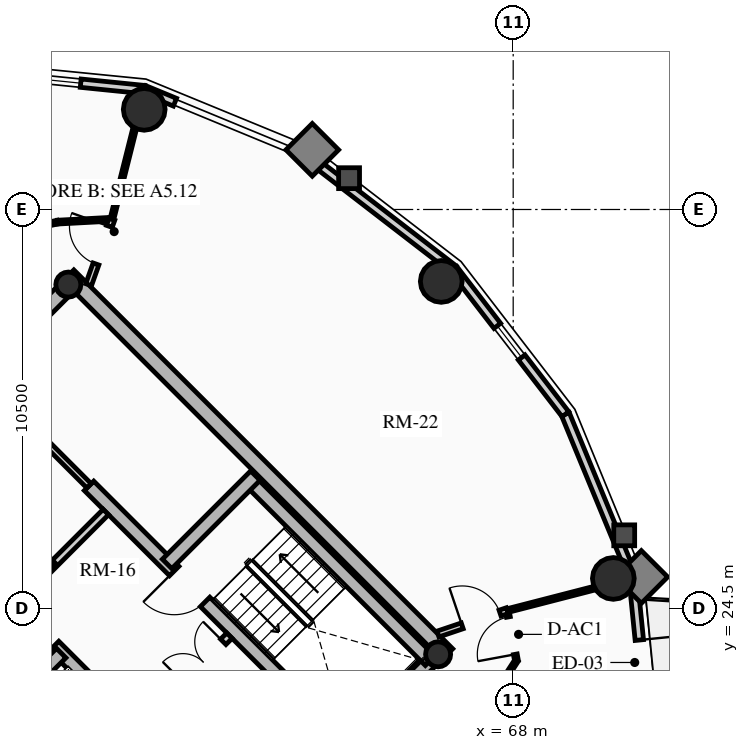
"""IFC4 building model, lengths in metres.
Left out: names, types, materials, properties, quantities, classifications, styles, units other than length and angle.
Written with IfcOpenShell. Run it as: python <this file> out.ifc"""

import sys

from ifc_helpers import new_model, si_unit, direction, frame, frame_2d, origin, origin_2d, place, context, subcontext, project, spatial, rectangle, circle, hollow_circle, extrude, source, transform, mapped, element, fill, save


model = new_model("IFC4")
c1 = context("Model", 3, precision=1e-05, world=origin(), true_north=direction((0.0, 1.0)))
c2 = subcontext(c1, "Body", "Model", "MODEL_VIEW")
j1 = project(units=[si_unit("LENGTHUNIT", "METRE"), si_unit("PLANEANGLEUNIT", "RADIAN")], contexts=[c1])
p1 = place(None, origin())
s1 = spatial("IfcSite", under=j1, at=p1, CompositionType="ELEMENT")
p2 = place(p1, origin())
s2 = spatial("IfcBuilding", under=s1, at=p2, CompositionType="ELEMENT")
p3 = place(p2, frame((0.0, 0.0, 196.66)))
s3 = spatial("IfcBuildingStorey", under=s2, at=p3, CompositionType="ELEMENT", Elevation=196.66)
for number, where, z_axis, x_axis in (
    (1, (58.702, 15.732, 0.0), (0.0, 0.0, 1.0), (-0.707, 0.707, 0.0)),
    (2, (66.268, 23.298, 0.0), (0.0, 0.0, 1.0), (-0.707, 0.707, 0.0)),
):
    element("IfcWall", number, at=place(p3, frame(where, z_axis=z_axis, x_axis=x_axis)), inside=s3, PredefinedType="SHEAR", context=c2, shape_type="SweptSolid", body=[
        extrude(rectangle(XDim=14.1, YDim=0.4, at=frame_2d((7.05, 0.0))), origin(), (0.0, 0.0, 1.0), 2.91),
    ])
p4 = place(p3, frame((58.561, 15.873, 0.0), z_axis=(0.0, 0.0, 1.0), x_axis=(0.707106781187, 0.707106781187, 0.0)))
e3 = element("IfcWall", 3, at=p4, inside=s3, PredefinedType="SHEAR", context=c2, shape_type="SweptSolid", body=[
    extrude(rectangle(XDim=10.7, YDim=0.4, at=frame_2d((5.35, 0.0))), origin(), (0.0, 0.0, 1.0), 2.91),
])
m1 = source(origin(), c2, "Body", "SweptSolid", [
    extrude(rectangle(XDim=1.5, YDim=2.02, at=frame_2d((0.75, 1.01))), frame((0.0, 0.21, 0.0), z_axis=(0.0, -1.0, 0.0), x_axis=(1.0, 0.0, 0.0)), (0.0, 0.0, 1.0), 0.42),
])
p5 = place(p4, frame((5.45, 0.0, 0.0)))
e4 = element("IfcOpeningElement", 4, at=p5, cuts=e3, PredefinedType="OPENING", context=c2, shape_type="MappedRepresentation", body=[
    mapped(m1, transform((0.0, 0.0, 0.0), x_axis=(1.0, 0.0, 0.0), y_axis=(0.0, 1.0, 0.0), z_axis=(0.0, 0.0, 1.0), scale=1.0)),
])
p6 = place(p3, frame((48.873, 25.561, 0.0), z_axis=(0.0, 0.0, 1.0), x_axis=(0.707106781187, 0.707106781187, 0.0)))
e5 = element("IfcWall", 5, at=p6, inside=s3, PredefinedType="SHEAR", context=c2, shape_type="SweptSolid", body=[
    extrude(rectangle(XDim=10.7, YDim=0.4, at=frame_2d((5.35, 0.0))), origin(), (0.0, 0.0, 1.0), 2.91),
])
p7 = place(p6, frame((4.6, 0.0, 0.0)))
e6 = element("IfcOpeningElement", 6, at=p7, cuts=e5, PredefinedType="OPENING", context=c2, shape_type="MappedRepresentation", body=[
    mapped(m1, transform((0.0, 0.0, 0.0), x_axis=(1.0, 0.0, 0.0), y_axis=(0.0, 1.0, 0.0), z_axis=(0.0, 0.0, 1.0), scale=1.0)),
])
p8 = place(p3, frame((61.06, 18.373, 0.0), z_axis=(0.0, 0.0, 1.0), x_axis=(-0.707106781187, 0.707106781187, 0.0)))
e7 = element("IfcWall", 7, at=p8, inside=s3, PredefinedType="SHEAR", context=c2, shape_type="SweptSolid", body=[
    extrude(rectangle(XDim=13.7, YDim=0.35, at=frame_2d((6.85, 0.0))), origin(), (0.0, 0.0, 1.0), 2.91),
])
m2 = source(origin(), c2, "Body", "SweptSolid", [
    extrude(rectangle(XDim=1.1, YDim=2.015, at=frame_2d((0.55, 1.007))), frame((0.0, 0.185, 0.0), z_axis=(0.0, -1.0, 0.0), x_axis=(1.0, 0.0, 0.0)), (0.0, 0.0, 1.0), 0.37),
])
p9 = place(p8, frame((4.85, 0.0, 0.0)))
e8 = element("IfcOpeningElement", 8, at=p9, cuts=e7, PredefinedType="OPENING", context=c2, shape_type="MappedRepresentation", body=[
    mapped(m2, transform((0.0, 0.0, 0.0), x_axis=(1.0, 0.0, 0.0), y_axis=(0.0, 1.0, 0.0), z_axis=(0.0, 0.0, 1.0), scale=1.0)),
])
p10 = place(p8, frame((0.625, 0.0, 0.0)))
e9 = element("IfcOpeningElement", 9, at=p10, cuts=e7, PredefinedType="OPENING", context=c2, shape_type="MappedRepresentation", body=[
    mapped(m2, transform((0.0, 0.0, 0.0), x_axis=(1.0, 0.0, 0.0), y_axis=(0.0, 1.0, 0.0), z_axis=(0.0, 0.0, 1.0), scale=1.0)),
])
p11 = place(p8, frame((2.625, 0.0, 0.0)))
e10 = element("IfcOpeningElement", 10, at=p11, cuts=e7, PredefinedType="OPENING", context=c2, shape_type="MappedRepresentation", body=[
    mapped(m2, transform((0.0, 0.0, 0.0), x_axis=(1.0, 0.0, 0.0), y_axis=(0.0, 1.0, 0.0), z_axis=(0.0, 0.0, 1.0), scale=1.0)),
])
m3 = source(origin(), c2, "Body", "SweptSolid", [
    extrude(rectangle(XDim=1.15, YDim=2.02, at=frame_2d((0.575, 1.01))), frame((0.0, 0.185, 0.0), z_axis=(0.0, -1.0, 0.0), x_axis=(1.0, 0.0, 0.0)), (0.0, 0.0, 1.0), 0.37),
])
p12 = place(p8, frame((7.27, 0.0, 0.0)))
e11 = element("IfcOpeningElement", 11, at=p12, cuts=e7, PredefinedType="OPENING", context=c2, shape_type="MappedRepresentation", body=[
    mapped(m3, transform((0.0, 0.0, 0.0), x_axis=(1.0, 0.0, 0.0), y_axis=(0.0, 1.0, 0.0), z_axis=(0.0, 0.0, 1.0), scale=1.0)),
])
p13 = place(p3, frame((63.627, 20.94, 0.0), z_axis=(0.0, 0.0, 1.0), x_axis=(-0.707119496762, 0.707094065383, 0.0)))
e12 = element("IfcWall", 12, at=p13, inside=s3, PredefinedType="SHEAR", context=c2, shape_type="SweptSolid", body=[
    extrude(rectangle(XDim=9.6, YDim=0.35, at=frame_2d((4.8, 0.0))), origin(), (0.0, 0.0, 1.0), 2.91),
])
p14 = place(p13, frame((5.28, 0.0, 0.0)))
e13 = element("IfcOpeningElement", 13, at=p14, cuts=e12, PredefinedType="OPENING", context=c2, shape_type="MappedRepresentation", body=[
    mapped(m3, transform((0.0, 0.0, 0.0), x_axis=(1.0, 0.0, 0.0), y_axis=(0.0, 1.0, 0.0), z_axis=(0.0, 0.0, 1.0), scale=1.0)),
])
p15 = place(p3, frame((53.784, 21.003, 0.0), z_axis=(0.0, 0.0, 1.0), x_axis=(0.707106781187, 0.707106781187, 0.0)))
e14 = element("IfcWall", 14, at=p15, inside=s3, PredefinedType="SHEAR", context=c2, shape_type="SweptSolid", body=[
    extrude(rectangle(XDim=3.285, YDim=0.35, at=frame_2d((1.643, 0.0))), origin(), (0.0, 0.0, 1.0), 2.91),
])
p16 = place(p3, frame((65.812, 23.125, 0.0), z_axis=(0.0, 0.0, 1.0), x_axis=(-0.707106781187, 0.707106781187, 0.0)))
e15 = element("IfcWall", 15, at=p16, inside=s3, PredefinedType="SHEAR", context=c2, shape_type="SweptSolid", body=[
    extrude(rectangle(XDim=6.695, YDim=0.35, at=frame_2d((3.348, 0.0))), origin(), (0.0, 0.0, 1.0), 2.91),
])
p17 = place(p3, frame((58.893, 25.674, 0.0), z_axis=(0.0, 0.0, 1.0), x_axis=(0.707106781187, 0.707106781187, 0.0)))
e16 = element("IfcWall", 16, at=p17, inside=s3, PredefinedType="SHEAR", context=c2, shape_type="SweptSolid", body=[
    extrude(rectangle(XDim=3.285, YDim=0.35, at=frame_2d((1.643, 0.0))), origin(), (0.0, 0.0, 1.0), 2.91),
])
for number, where, z_axis, x_axis in (
    (17, (66.024, 23.294, 0.0), (0.0, 0.0, 1.0), (0.707, 0.707, 0.0)),
    (18, (56.294, 33.024, 0.0), (0.0, 0.0, 1.0), (0.707, 0.707, 0.0)),
):
    element("IfcColumn", number, at=place(p3, frame(where, z_axis=z_axis, x_axis=x_axis)), inside=s3, PredefinedType="COLUMN", context=c2, shape_type="SweptSolid", body=[
        extrude(hollow_circle(Radius=0.33, WallThickness=0.025, at=origin_2d()), origin(), (0.0, 0.0, 1.0), 2.91),
    ])
for number, where, z_axis, x_axis in (
    (19, (66.107, 33.107, 0.0), (0.0, 0.0, 1.0), (1.0, 0.0, 0.0)),
    (20, (58.291, 37.635, 0.0), (0.0, 0.0, 1.0), (1.0, 0.0, 0.0)),
    (21, (70.635, 25.291, 0.0), (0.0, 0.0, 1.0), (1.0, 0.0, 0.0)),
):
    element("IfcColumn", number, at=place(p3, frame(where, z_axis=z_axis, x_axis=x_axis)), inside=s3, PredefinedType="USERDEFINED", context=c2, shape_type="SweptSolid", body=[
        extrude(circle(Radius=0.55, at=origin_2d()), origin(), (0.0, 0.0, 1.0), 2.91),
    ])
p18 = place(p3, frame((62.613, 36.374, 0.0), z_axis=(0.0, 0.0, 1.0), x_axis=(0.791998462147, -0.610523083886, 0.0)))
e22 = element("IfcWall", 22, at=p18, inside=s3, PredefinedType="SOLIDWALL", context=c2, shape_type="SweptSolid", body=[
    extrude(rectangle(XDim=4.82, YDim=0.22, at=frame_2d((2.41, 0.0))), origin(), (0.0, 0.0, 1.0), 2.322),
])
p19 = place(p3, frame((58.295, 38.155, 0.0), z_axis=(0.0, 0.0, 1.0), x_axis=(0.924515260676, -0.381145028536, 0.0)))
e23 = element("IfcWall", 23, at=p19, inside=s3, PredefinedType="SOLIDWALL", context=c2, shape_type="SweptSolid", body=[
    extrude(rectangle(XDim=0.87, YDim=0.22, at=frame_2d((0.435, 0.0))), origin(), (0.0, 0.0, 1.0), 2.322),
])
p20 = place(p3, frame((53.9, 38.599, 0.0), z_axis=(0.0, 0.0, 1.0), x_axis=(0.994929930991, -0.100570534541, 0.0)))
e24 = element("IfcWall", 24, at=p20, inside=s3, PredefinedType="SOLIDWALL", context=c2, shape_type="SweptSolid", body=[
    extrude(rectangle(XDim=4.418, YDim=0.22, at=frame_2d((2.209, 0.0))), origin(), (0.0, 0.0, 1.0), 2.322),
])
m4 = source(origin(), c2, "Body", "SweptSolid", [
    extrude(rectangle(XDim=1.05, YDim=1.3, at=frame_2d((0.525, 0.65))), frame((0.0, 0.12, 0.0), z_axis=(0.0, -1.0, 0.0), x_axis=(1.0, 0.0, 0.0)), (0.0, 0.0, 1.0), 0.24),
])
p21 = place(p20, frame((1.684, 0.0, 0.65)))
e25 = element("IfcOpeningElement", 25, at=p21, cuts=e24, PredefinedType="OPENING", context=c2, shape_type="MappedRepresentation", body=[
    mapped(m4, transform((0.0, 0.0, 0.0), x_axis=(1.0, 0.0, 0.0), y_axis=(0.0, 1.0, 0.0), z_axis=(0.0, 0.0, 1.0), scale=1.0)),
])
p22 = place(p3, frame((71.155, 25.295, 0.0), z_axis=(0.0, 0.0, 1.0), x_axis=(0.100570534541, -0.994929930991, 0.0)))
e26 = element("IfcWall", 26, at=p22, inside=s3, PredefinedType="SOLIDWALL", context=c2, shape_type="SweptSolid", body=[
    extrude(rectangle(XDim=4.418, YDim=0.22, at=frame_2d((2.209, 0.0))), origin(), (0.0, 0.0, 1.0), 2.322),
])
m5 = source(origin(), c2, "Body", "SweptSolid", [
    extrude(rectangle(XDim=1.15, YDim=2.005, at=frame_2d((0.575, 1.002))), frame((0.0, 0.12, 0.0), z_axis=(0.0, -1.0, 0.0), x_axis=(1.0, 0.0, 0.0)), (0.0, 0.0, 1.0), 0.24),
])
p23 = place(p22, frame((1.634, 0.0, 0.0)))
e27 = element("IfcOpeningElement", 27, at=p23, cuts=e26, PredefinedType="OPENING", context=c2, shape_type="MappedRepresentation", body=[
    mapped(m5, transform((0.0, 0.0, 0.0), x_axis=(1.0, 0.0, 0.0), y_axis=(0.0, 1.0, 0.0), z_axis=(0.0, 0.0, 1.0), scale=1.0)),
])
p24 = place(p3, frame((69.374, 29.613, 0.0), z_axis=(0.0, 0.0, 1.0), x_axis=(0.381309704956, -0.924447353237, 0.0)))
e28 = element("IfcWall", 28, at=p24, inside=s3, PredefinedType="SOLIDWALL", context=c2, shape_type="SweptSolid", body=[
    extrude(rectangle(XDim=4.671, YDim=0.22, at=frame_2d((2.335, 0.0))), origin(), (0.0, 0.0, 1.0), 2.322),
])
p25 = place(p3, frame((66.431, 33.431, 0.0), z_axis=(0.0, 0.0, 1.0), x_axis=(0.610523083886, -0.791998462147, 0.0)))
e29 = element("IfcWall", 29, at=p25, inside=s3, PredefinedType="SOLIDWALL", context=c2, shape_type="SweptSolid", body=[
    extrude(rectangle(XDim=4.82, YDim=0.22, at=frame_2d((2.41, 0.0))), origin(), (0.0, 0.0, 1.0), 2.322),
])
p26 = place(p25, frame((1.885, 0.0, 0.65)))
e30 = element("IfcOpeningElement", 30, at=p26, cuts=e29, PredefinedType="OPENING", context=c2, shape_type="MappedRepresentation", body=[
    mapped(m4, transform((0.0, 0.0, 0.0), x_axis=(1.0, 0.0, 0.0), y_axis=(0.0, 1.0, 0.0), z_axis=(0.0, 0.0, 1.0), scale=1.0)),
])
p27 = place(p3, frame((58.214, 21.467, 0.0), z_axis=(0.0, 0.0, 1.0), x_axis=(0.707106781187, 0.707106781187, 0.0)))
e31 = element("IfcWall", 31, at=p27, inside=s3, PredefinedType="PARTITIONING", context=c2, shape_type="SweptSolid", body=[
    extrude(rectangle(XDim=3.28, YDim=0.2, at=frame_2d((1.64, 0.0))), origin(), (0.0, 0.0, 1.0), 2.685),
])
m6 = source(origin(), c2, "Body", "SweptSolid", [
    extrude(rectangle(XDim=1.5, YDim=2.02, at=frame_2d((0.75, 1.01))), frame((0.0, 0.11, 0.0), z_axis=(0.0, -1.0, 0.0), x_axis=(1.0, 0.0, 0.0)), (0.0, 0.0, 1.0), 0.22),
])
p28 = place(p27, frame((1.55, 0.0, 0.0)))
e32 = element("IfcOpeningElement", 32, at=p28, cuts=e31, PredefinedType="OPENING", context=c2, shape_type="MappedRepresentation", body=[
    mapped(m6, transform((0.0, 0.0, 0.0), x_axis=(1.0, 0.0, 0.0), y_axis=(0.0, 1.0, 0.0), z_axis=(0.0, 0.0, 1.0), scale=1.0)),
])
p29 = place(p3, frame((54.961, 24.719, 0.0), z_axis=(0.0, 0.0, 1.0), x_axis=(0.707106781187, 0.707106781187, 0.0)))
e33 = element("IfcWall", 33, at=p29, inside=s3, PredefinedType="PARTITIONING", context=c2, shape_type="SweptSolid", body=[
    extrude(rectangle(XDim=3.28, YDim=0.2, at=frame_2d((1.64, 0.0))), origin(), (0.0, 0.0, 1.0), 2.685),
])
m7 = source(origin(), c2, "Body", "SweptSolid", [
    extrude(rectangle(XDim=0.9, YDim=2.005, at=frame_2d((0.45, 1.002))), frame((0.0, 0.11, 0.0), z_axis=(0.0, -1.0, 0.0), x_axis=(1.0, 0.0, 0.0)), (0.0, 0.0, 1.0), 0.22),
])
p30 = place(p29, frame((0.16, 0.0, 0.0)))
e34 = element("IfcOpeningElement", 34, at=p30, cuts=e33, PredefinedType="OPENING", context=c2, shape_type="MappedRepresentation", body=[
    mapped(m7, transform((0.0, 0.0, 0.0), x_axis=(1.0, 0.0, 0.0), y_axis=(0.0, 1.0, 0.0), z_axis=(0.0, 0.0, 1.0), scale=1.0)),
])
p31 = place(p3, frame((55.874, 25.631, 0.0), z_axis=(0.0, 0.0, 1.0), x_axis=(-0.707157639372, 0.707055919343, 0.0)))
e35 = element("IfcWall", 35, at=p31, inside=s3, PredefinedType="PARTITIONING", context=c2, shape_type="SweptSolid", body=[
    extrude(rectangle(XDim=2.4, YDim=0.2, at=frame_2d((1.2, 0.0))), origin(), (0.0, 0.0, 1.0), 2.685),
])
p32 = place(p3, frame((56.839, 27.728, 0.0), z_axis=(0.0, 0.0, 1.0), x_axis=(-0.707106781187, 0.707106781187, 0.0)))
e36 = element("IfcWall", 36, at=p32, inside=s3, PredefinedType="PARTITIONING", context=c2, shape_type="SweptSolid", body=[
    extrude(rectangle(XDim=3.9, YDim=0.16, at=frame_2d((1.95, 0.0))), origin(), (0.0, 0.0, 1.0), 2.685),
])
m8 = source(origin(), c2, "Body", "SweptSolid", [
    extrude(rectangle(XDim=0.9, YDim=2.005, at=frame_2d((0.45, 1.002))), frame((0.0, 0.09, 0.0), z_axis=(0.0, -1.0, 0.0), x_axis=(1.0, 0.0, 0.0)), (0.0, 0.0, 1.0), 0.18),
])
p33 = place(p32, frame((2.2, 0.0, 0.0)))
e37 = element("IfcOpeningElement", 37, at=p33, cuts=e36, PredefinedType="OPENING", context=c2, shape_type="MappedRepresentation", body=[
    mapped(m8, transform((0.0, 0.0, 0.0), x_axis=(1.0, 0.0, 0.0), y_axis=(0.0, 1.0, 0.0), z_axis=(0.0, 0.0, 1.0), scale=1.0)),
])
p34 = place(p3, frame((57.44, 34.744, 0.0), z_axis=(0.0, 0.0, 1.0), x_axis=(-0.998578025565, -0.053309725738, 0.0)))
e38 = element("IfcWall", 38, at=p34, inside=s3, PredefinedType="MOVABLE", context=c2, shape_type="SweptSolid", body=[
    extrude(rectangle(XDim=1.433, YDim=0.1, at=frame_2d((0.717, 0.0))), origin(), (0.0, 0.0, 1.0), 2.322),
])
p35 = place(p3, frame((56.009, 34.667, 0.0), z_axis=(0.0, 0.0, 1.0), x_axis=(-0.977625498152, -0.210353001795, 0.0)))
e39 = element("IfcWall", 39, at=p35, inside=s3, PredefinedType="MOVABLE", context=c2, shape_type="SweptSolid", body=[
    extrude(rectangle(XDim=1.538, YDim=0.1, at=frame_2d((0.769, 0.0))), origin(), (0.0, 0.0, 1.0), 2.255),
])
p36 = place(p3, frame((67.095, 21.6, 0.0), z_axis=(0.0, 0.0, 1.0), x_axis=(0.543773190184, 0.839232219137, 0.0)))
e40 = element("IfcWall", 40, at=p36, inside=s3, PredefinedType="MOVABLE", context=c2, shape_type="SweptSolid", body=[
    extrude(rectangle(XDim=1.823, YDim=0.1, at=frame_2d((0.911, 0.0))), origin(), (0.0, 0.0, 1.0), 2.255),
])
p37 = place(p3, frame((68.086, 23.129, 0.0), z_axis=(0.0, 0.0, 1.0), x_axis=(-0.182004193146, 0.983297754334, 0.0)))
e41 = element("IfcWall", 41, at=p37, inside=s3, PredefinedType="MOVABLE", context=c2, shape_type="SweptSolid", body=[
    extrude(rectangle(XDim=1.336, YDim=0.1, at=frame_2d((0.668, 0.0))), origin(), (0.0, 0.0, 1.0), 2.322),
])
m9 = source(origin(), c2, "Body", "SweptSolid", [
    extrude(rectangle(XDim=1.0, YDim=2.015, at=frame_2d((0.5, 1.007))), frame((0.0, 0.06, 0.0), z_axis=(0.0, -1.0, 0.0), x_axis=(1.0, 0.0, 0.0)), (0.0, 0.0, 1.0), 0.12),
])
p38 = place(p37, frame((0.168, 0.0, 0.0)))
e42 = element("IfcOpeningElement", 42, at=p38, cuts=e41, PredefinedType="OPENING", context=c2, shape_type="MappedRepresentation", body=[
    mapped(m9, transform((0.0, 0.0, 0.0), x_axis=(1.0, 0.0, 0.0), y_axis=(0.0, 1.0, 0.0), z_axis=(0.0, 0.0, 1.0), scale=1.0)),
])
p39 = place(p3, frame((57.44, 34.744, 0.0), z_axis=(0.0, 0.0, 1.0), x_axis=(0.243619816457, 0.969870808422, 0.0)))
e43 = element("IfcWall", 43, at=p39, inside=s3, PredefinedType="MOVABLE", context=c2, shape_type="SweptSolid", body=[
    extrude(rectangle(XDim=3.496, YDim=0.1, at=frame_2d((1.748, 0.0))), origin(), (0.0, 0.0, 1.0), 2.322),
])
p40 = place(p3, frame((67.843, 24.443, 0.0), z_axis=(0.0, 0.0, 1.0), x_axis=(0.968303102463, 0.249778105048, 0.0)))
e44 = element("IfcWall", 44, at=p40, inside=s3, PredefinedType="MOVABLE", context=c2, shape_type="SweptSolid", body=[
    extrude(rectangle(XDim=3.399, YDim=0.1, at=frame_2d((1.7, 0.0))), origin(), (0.0, 0.0, 1.0), 2.322),
])
p41 = place(p3, frame((56.828, 33.021, 0.0), z_axis=(0.0, 0.0, 1.0), x_axis=(0.334788446034, 0.942293317605, 0.0)))
e45 = element("IfcWall", 45, at=p41, inside=s3, PredefinedType="PARTITIONING", context=c2, shape_type="SweptSolid", body=[
    extrude(rectangle(XDim=1.829, YDim=0.16, at=frame_2d((0.915, 0.0))), origin(), (0.0, 0.0, 1.0), 2.255),
])
m10 = source(origin(), c2, "Body", "SweptSolid", [
    extrude(rectangle(XDim=1.05, YDim=2.015, at=frame_2d((0.525, 1.007))), frame((0.0, 0.09, 0.0), z_axis=(0.0, -1.0, 0.0), x_axis=(1.0, 0.0, 0.0)), (0.0, 0.0, 1.0), 0.18),
])
p42 = place(p41, frame((0.579, 0.0, 0.0)))
e46 = element("IfcOpeningElement", 46, at=p42, cuts=e45, PredefinedType="OPENING", context=c2, shape_type="MappedRepresentation", body=[
    mapped(m10, transform((0.0, 0.0, 0.0), x_axis=(1.0, 0.0, 0.0), y_axis=(0.0, 1.0, 0.0), z_axis=(0.0, 0.0, 1.0), scale=1.0)),
])
p43 = place(p3, frame((66.021, 23.828, 0.0), z_axis=(0.0, 0.0, 1.0), x_axis=(0.947522075691, 0.319690344049, 0.0)))
e47 = element("IfcWall", 47, at=p43, inside=s3, PredefinedType="PARTITIONING", context=c2, shape_type="SweptSolid", body=[
    extrude(rectangle(XDim=1.924, YDim=0.16, at=frame_2d((0.962, 0.0))), origin(), (0.0, 0.0, 1.0), 2.255),
])
p44 = place(p43, frame((0.674, 0.0, 0.0)))
e48 = element("IfcOpeningElement", 48, at=p44, cuts=e47, PredefinedType="OPENING", context=c2, shape_type="MappedRepresentation", body=[
    mapped(m10, transform((0.0, 0.0, 0.0), x_axis=(1.0, 0.0, 0.0), y_axis=(0.0, 1.0, 0.0), z_axis=(0.0, 0.0, 1.0), scale=1.0)),
])
m11 = source(origin(), c2, "Body", "SweptSolid", [
    extrude(rectangle(XDim=1.05, YDim=1.3, at=frame_2d((0.525, 0.65))), frame((0.0, 0.03, 0.0), z_axis=(0.0, -1.0, 0.0), x_axis=(1.0, 0.0, 0.0)), (0.0, 0.0, 1.0), 0.06),
])
p45 = place(p21, origin())
e49 = element("IfcWindow", 49, at=p45, inside=s3, PartitioningType="SINGLE_PANEL", PredefinedType="WINDOW", context=c2, shape_type="MappedRepresentation", body=[
    mapped(m11, transform((0.0, 0.0, 0.0), x_axis=(1.0, 0.0, 0.0), y_axis=(0.0, 1.0, 0.0), z_axis=(0.0, 0.0, 1.0), scale=1.0)),
])
fill(e25, e49)
m12 = source(origin(), c2, "Body", "SweptSolid", [
    extrude(rectangle(XDim=1.15, YDim=2.005, at=frame_2d((0.575, 1.002))), frame((0.0, 0.025, 0.0), z_axis=(0.0, -1.0, 0.0), x_axis=(1.0, 0.0, 0.0)), (0.0, 0.0, 1.0), 0.05),
])
p46 = place(p23, origin())
e50 = element("IfcDoor", 50, at=p46, inside=s3, OperationType="SINGLE_SWING_LEFT", PredefinedType="DOOR", context=c2, shape_type="MappedRepresentation", body=[
    mapped(m12, transform((0.0, 0.0, 0.0), x_axis=(1.0, 0.0, 0.0), y_axis=(0.0, 1.0, 0.0), z_axis=(0.0, 0.0, 1.0), scale=1.0)),
])
fill(e27, e50)
p47 = place(p26, origin())
e51 = element("IfcWindow", 51, at=p47, inside=s3, PartitioningType="SINGLE_PANEL", PredefinedType="WINDOW", context=c2, shape_type="MappedRepresentation", body=[
    mapped(m11, transform((0.0, 0.0, 0.0), x_axis=(1.0, 0.0, 0.0), y_axis=(0.0, 1.0, 0.0), z_axis=(0.0, 0.0, 1.0), scale=1.0)),
])
fill(e30, e51)
m13 = source(origin(), c2, "Body", "SweptSolid", [
    extrude(rectangle(XDim=1.15, YDim=2.02, at=frame_2d((0.575, 1.01))), frame((0.0, 0.025, 0.0), z_axis=(0.0, -1.0, 0.0), x_axis=(1.0, 0.0, 0.0)), (0.0, 0.0, 1.0), 0.05),
])
p48 = place(p12, origin())
e52 = element("IfcDoor", 52, at=p48, inside=s3, OperationType="SINGLE_SWING_LEFT", PredefinedType="DOOR", context=c2, shape_type="MappedRepresentation", body=[
    mapped(m13, transform((0.0, 0.0, 0.0), x_axis=(1.0, 0.0, 0.0), y_axis=(0.0, 1.0, 0.0), z_axis=(0.0, 0.0, 1.0), scale=1.0)),
])
fill(e11, e52)
p49 = place(p14, origin())
e53 = element("IfcDoor", 53, at=p49, inside=s3, OperationType="SINGLE_SWING_RIGHT", PredefinedType="DOOR", context=c2, shape_type="MappedRepresentation", body=[
    mapped(m13, transform((0.0, 0.0, 0.0), x_axis=(1.0, 0.0, 0.0), y_axis=(0.0, 1.0, 0.0), z_axis=(0.0, 0.0, 1.0), scale=1.0)),
])
fill(e13, e53)
m14 = source(origin(), c2, "Body", "SweptSolid", [
    extrude(rectangle(XDim=1.5, YDim=2.02, at=frame_2d((0.75, 1.01))), frame((0.0, 0.025, 0.0), z_axis=(0.0, -1.0, 0.0), x_axis=(1.0, 0.0, 0.0)), (0.0, 0.0, 1.0), 0.05),
])
p50 = place(p28, origin())
e54 = element("IfcDoor", 54, at=p50, inside=s3, OperationType="DOUBLE_DOOR_SINGLE_SWING", PredefinedType="DOOR", context=c2, shape_type="MappedRepresentation", body=[
    mapped(m14, transform((0.0, 0.0, 0.0), x_axis=(1.0, 0.0, 0.0), y_axis=(0.0, 1.0, 0.0), z_axis=(0.0, 0.0, 1.0), scale=1.0)),
])
fill(e32, e54)
m15 = source(origin(), c2, "Body", "SweptSolid", [
    extrude(rectangle(XDim=1.05, YDim=2.015, at=frame_2d((0.525, 1.007))), frame((0.0, 0.025, 0.0), z_axis=(0.0, -1.0, 0.0), x_axis=(1.0, 0.0, 0.0)), (0.0, 0.0, 1.0), 0.05),
])
p51 = place(p42, origin())
e55 = element("IfcDoor", 55, at=p51, inside=s3, OperationType="SINGLE_SWING_RIGHT", PredefinedType="DOOR", context=c2, shape_type="MappedRepresentation", body=[
    mapped(m15, transform((0.0, 0.0, 0.0), x_axis=(1.0, 0.0, 0.0), y_axis=(0.0, 1.0, 0.0), z_axis=(0.0, 0.0, 1.0), scale=1.0)),
])
fill(e46, e55)
p52 = place(p44, origin())
e56 = element("IfcDoor", 56, at=p52, inside=s3, OperationType="SINGLE_SWING_LEFT", PredefinedType="DOOR", context=c2, shape_type="MappedRepresentation", body=[
    mapped(m15, transform((0.0, 0.0, 0.0), x_axis=(1.0, 0.0, 0.0), y_axis=(0.0, 1.0, 0.0), z_axis=(0.0, 0.0, 1.0), scale=1.0)),
])
fill(e48, e56)
m16 = source(origin(), c2, "Body", "SweptSolid", [
    extrude(rectangle(XDim=1.0, YDim=2.015, at=frame_2d((0.5, 1.007))), frame((0.0, 0.025, 0.0), z_axis=(0.0, -1.0, 0.0), x_axis=(1.0, 0.0, 0.0)), (0.0, 0.0, 1.0), 0.05),
])
p53 = place(p38, origin())
e57 = element("IfcDoor", 57, at=p53, inside=s3, OperationType="SINGLE_SWING_LEFT", PredefinedType="DOOR", context=c2, shape_type="MappedRepresentation", body=[
    mapped(m16, transform((0.0, 0.0, 0.0), x_axis=(1.0, 0.0, 0.0), y_axis=(0.0, 1.0, 0.0), z_axis=(0.0, 0.0, 1.0), scale=1.0)),
])
fill(e42, e57)
save(model, sys.argv[1])
